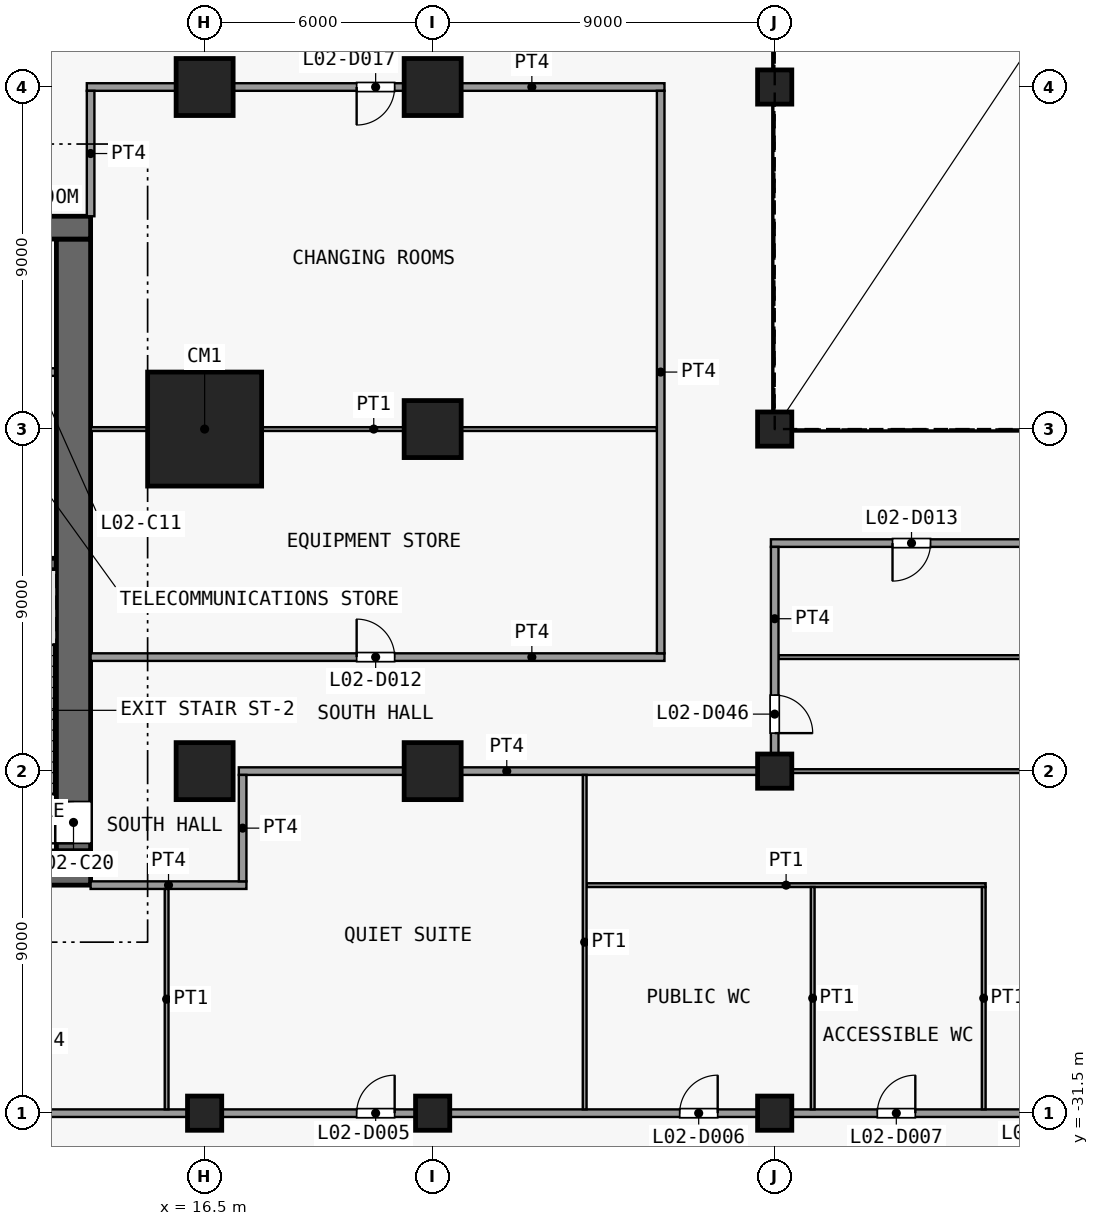
"""IFC4 building model, lengths in metres.
Left out: names, types, materials, properties, quantities, classifications, styles, units other than length and angle.
Written with IfcOpenShell. Run it as: python <this file> out.ifc"""

import sys

from ifc_helpers import new_model, si_unit, direction, frame, frame_2d, origin, origin_2d, place, context, subcontext, project, spatial, rectangle, extrude, element, fill, save


model = new_model("IFC4")
c1 = context("Model", 3, precision=1e-05, world=origin(), true_north=direction((0.0, 1.0)))
c2 = subcontext(c1, "Body", "Model", "MODEL_VIEW")
j1 = project(units=[si_unit("LENGTHUNIT", "METRE"), si_unit("PLANEANGLEUNIT", "RADIAN")], contexts=[c1])
p1 = place(None, origin())
s1 = spatial("IfcSite", under=j1, at=p1, CompositionType="ELEMENT")
p2 = place(p1, origin())
s2 = spatial("IfcBuilding", under=s1, at=p2, CompositionType="ELEMENT")
p3 = place(p2, frame((0.0, 0.0, 13.5)))
s3 = spatial("IfcBuildingStorey", under=s2, at=p3, CompositionType="ELEMENT", Elevation=13.5)
p4 = place(p3, frame((16.5, -31.5, 0.0), z_axis=(0.0, 0.0, 1.0), x_axis=(1.0, 0.0, 0.0)))
e1 = element("IfcColumn", 1, at=p4, inside=s3, PredefinedType="COLUMN", context=c2, shape_type="SweptSolid", body=[
    extrude(rectangle(XDim=0.9, YDim=0.9, at=origin_2d()), origin(), (0.0, 0.0, 1.0), 5.0),
])
p5 = place(p3, frame((16.5, -22.5, 0.0), z_axis=(0.0, 0.0, 1.0), x_axis=(1.0, 0.0, 0.0)))
e2 = element("IfcColumn", 2, at=p5, inside=s3, PredefinedType="COLUMN", context=c2, shape_type="SweptSolid", body=[
    extrude(rectangle(XDim=1.5, YDim=1.5, at=origin_2d()), origin(), (0.0, 0.0, 1.0), 5.0),
])
p6 = place(p3, frame((16.5, -13.5, 0.0), z_axis=(0.0, 0.0, 1.0), x_axis=(1.0, 0.0, 0.0)))
e3 = element("IfcColumn", 3, at=p6, inside=s3, PredefinedType="COLUMN", context=c2, shape_type="SweptSolid", body=[
    extrude(rectangle(XDim=3.0, YDim=3.0, at=origin_2d()), origin(), (0.0, 0.0, 1.0), 5.0),
])
p7 = place(p3, frame((16.5, -4.5, 0.0), z_axis=(0.0, 0.0, 1.0), x_axis=(1.0, 0.0, 0.0)))
e4 = element("IfcColumn", 4, at=p7, inside=s3, PredefinedType="COLUMN", context=c2, shape_type="SweptSolid", body=[
    extrude(rectangle(XDim=1.5, YDim=1.5, at=origin_2d()), origin(), (0.0, 0.0, 1.0), 5.0),
])
p8 = place(p3, frame((22.5, -31.5, 0.0), z_axis=(0.0, 0.0, 1.0), x_axis=(1.0, 0.0, 0.0)))
e5 = element("IfcColumn", 5, at=p8, inside=s3, PredefinedType="COLUMN", context=c2, shape_type="SweptSolid", body=[
    extrude(rectangle(XDim=0.9, YDim=0.9, at=origin_2d()), origin(), (0.0, 0.0, 1.0), 5.0),
])
for number, where, z_axis, x_axis in (
    (6, (22.5, -22.5, 0.0), (0.0, 0.0, 1.0), (1.0, 0.0, 0.0)),
    (7, (22.5, -13.5, 0.0), (0.0, 0.0, 1.0), (1.0, 0.0, 0.0)),
    (8, (22.5, -4.5, 0.0), (0.0, 0.0, 1.0), (1.0, 0.0, 0.0)),
):
    element("IfcColumn", number, at=place(p3, frame(where, z_axis=z_axis, x_axis=x_axis)), inside=s3, PredefinedType="COLUMN", context=c2, shape_type="SweptSolid", body=[
        extrude(rectangle(XDim=1.5, YDim=1.5, at=origin_2d()), origin(), (0.0, 0.0, 1.0), 5.0),
    ])
for number, where, z_axis, x_axis in (
    (9, (31.5, -31.5, 0.0), (0.0, 0.0, 1.0), (1.0, 0.0, 0.0)),
    (10, (31.5, -22.5, 0.0), (0.0, 0.0, 1.0), (1.0, 0.0, 0.0)),
    (11, (31.5, -13.5, 0.0), (0.0, 0.0, 1.0), (1.0, 0.0, 0.0)),
    (12, (31.5, -4.5, 0.0), (0.0, 0.0, 1.0), (1.0, 0.0, 0.0)),
):
    element("IfcColumn", number, at=place(p3, frame(where, z_axis=z_axis, x_axis=x_axis)), inside=s3, PredefinedType="COLUMN", context=c2, shape_type="SweptSolid", body=[
        extrude(rectangle(XDim=0.9, YDim=0.9, at=origin_2d()), origin(), (0.0, 0.0, 1.0), 5.0),
    ])
p9 = place(p3, frame((-13.5, -25.05, 0.0), z_axis=(0.0, 0.0, 1.0), x_axis=(1.0, 0.0, 0.0)))
e13 = element("IfcWall", 13, at=p9, inside=s3, PredefinedType="SHEAR", context=c2, shape_type="SweptSolid", body=[
    extrude(rectangle(XDim=27.0, YDim=0.9, at=frame_2d((13.5, 0.0))), origin(), (0.0, 0.0, 1.0), 4.65),
])
p10 = place(p3, frame((-13.5, -8.2, 0.0), z_axis=(0.0, 0.0, 1.0), x_axis=(1.0, 0.0, 0.0)))
e14 = element("IfcWall", 14, at=p10, inside=s3, PredefinedType="SHEAR", context=c2, shape_type="SweptSolid", body=[
    extrude(rectangle(XDim=27.0, YDim=0.6, at=frame_2d((13.5, 0.0))), origin(), (0.0, 0.0, 1.0), 4.65),
])
p11 = place(p10, frame((7.8, 0.0, 0.0)))
e15 = element("IfcOpeningElement", 15, at=p11, cuts=e14, PredefinedType="OPENING", context=c2, shape_type="SweptSolid", body=[
    extrude(rectangle(XDim=1.8, YDim=2.1, at=frame_2d((0.9, 1.05))), frame((0.0, 0.31, 0.0), z_axis=(0.0, -1.0, 0.0), x_axis=(1.0, 0.0, 0.0)), (0.0, 0.0, 1.0), 0.62),
])
p12 = place(p10, frame((17.4, 0.0, 0.0)))
e16 = element("IfcOpeningElement", 16, at=p12, cuts=e14, PredefinedType="OPENING", context=c2, shape_type="SweptSolid", body=[
    extrude(rectangle(XDim=1.8, YDim=2.1, at=frame_2d((0.9, 1.05))), frame((0.0, 0.31, 0.0), z_axis=(0.0, -1.0, 0.0), x_axis=(1.0, 0.0, 0.0)), (0.0, 0.0, 1.0), 0.62),
])
p13 = place(p10, frame((2.725, 0.0, 0.0)))
e17 = element("IfcOpeningElement", 17, at=p13, cuts=e14, PredefinedType="OPENING", context=c2, shape_type="SweptSolid", body=[
    extrude(rectangle(XDim=0.9, YDim=2.1, at=frame_2d((0.45, 1.05))), frame((0.0, 0.31, 0.0), z_axis=(0.0, -1.0, 0.0), x_axis=(1.0, 0.0, 0.0)), (0.0, 0.0, 1.0), 0.62),
])
p14 = place(p10, frame((23.375, 0.0, 0.0)))
e18 = element("IfcOpeningElement", 18, at=p14, cuts=e14, PredefinedType="OPENING", context=c2, shape_type="SweptSolid", body=[
    extrude(rectangle(XDim=0.9, YDim=2.1, at=frame_2d((0.45, 1.05))), frame((0.0, 0.31, 0.0), z_axis=(0.0, -1.0, 0.0), x_axis=(1.0, 0.0, 0.0)), (0.0, 0.0, 1.0), 0.62),
])
p15 = place(p3, frame((13.05, -24.6, 0.0), z_axis=(0.0, 0.0, 1.0), x_axis=(0.0, 1.0, 0.0)))
e19 = element("IfcWall", 19, at=p15, inside=s3, PredefinedType="SHEAR", context=c2, shape_type="SweptSolid", body=[
    extrude(rectangle(XDim=16.1, YDim=0.9, at=frame_2d((8.05, 0.0))), origin(), (0.0, 0.0, 1.0), 4.65),
])
p16 = place(p15, frame((0.2, 0.0, 0.0)))
e20 = element("IfcOpeningElement", 20, at=p16, cuts=e19, PredefinedType="OPENING", context=c2, shape_type="SweptSolid", body=[
    extrude(rectangle(XDim=1.1, YDim=2.1, at=frame_2d((0.55, 1.05))), frame((0.0, 0.46, 0.0), z_axis=(0.0, -1.0, 0.0), x_axis=(1.0, 0.0, 0.0)), (0.0, 0.0, 1.0), 0.92),
])
p17 = place(p3, frame((9.5, -17.05, 0.0), z_axis=(0.0, 0.0, 1.0), x_axis=(1.0, 0.0, 0.0)))
e21 = element("IfcWall", 21, at=p17, inside=s3, PredefinedType="SHEAR", context=c2, shape_type="SweptSolid", body=[
    extrude(rectangle(XDim=3.1, YDim=0.3, at=frame_2d((1.55, 0.0))), origin(), (0.0, 0.0, 1.0), 4.65),
])
p18 = place(p3, frame((11.15, -12.0, 0.0), z_axis=(0.0, 0.0, 1.0), x_axis=(1.0, 0.0, 0.0)))
e22 = element("IfcWall", 22, at=p18, inside=s3, PredefinedType="PARTITIONING", context=c2, shape_type="SweptSolid", body=[
    extrude(rectangle(XDim=1.45, YDim=0.2, at=frame_2d((0.725, 0.0))), origin(), (0.0, 0.0, 1.0), 4.65),
])
p19 = place(p3, frame((-25.9, -31.5, 0.0), z_axis=(0.0, 0.0, 1.0), x_axis=(1.0, 0.0, 0.0)))
e23 = element("IfcWall", 23, at=p19, inside=s3, PredefinedType="PARTITIONING", context=c2, shape_type="SweptSolid", body=[
    extrude(rectangle(XDim=78.15, YDim=0.2, at=frame_2d((39.075, 0.0))), origin(), (0.0, 0.0, 1.0), 4.65),
])
p20 = place(p19, frame((4.0, 0.0, 0.0)))
e24 = element("IfcOpeningElement", 24, at=p20, cuts=e23, PredefinedType="OPENING", context=c2, shape_type="SweptSolid", body=[
    extrude(rectangle(XDim=1.8, YDim=2.1, at=frame_2d((0.9, 1.05))), frame((0.0, 0.11, 0.0), z_axis=(0.0, -1.0, 0.0), x_axis=(1.0, 0.0, 0.0)), (0.0, 0.0, 1.0), 0.22),
])
p21 = place(p19, frame((16.0, 0.0, 0.0)))
e25 = element("IfcOpeningElement", 25, at=p21, cuts=e23, PredefinedType="OPENING", context=c2, shape_type="SweptSolid", body=[
    extrude(rectangle(XDim=1.8, YDim=2.1, at=frame_2d((0.9, 1.05))), frame((0.0, 0.11, 0.0), z_axis=(0.0, -1.0, 0.0), x_axis=(1.0, 0.0, 0.0)), (0.0, 0.0, 1.0), 0.22),
])
p22 = place(p19, frame((24.1, 0.0, 0.0)))
e26 = element("IfcOpeningElement", 26, at=p22, cuts=e23, PredefinedType="OPENING", context=c2, shape_type="SweptSolid", body=[
    extrude(rectangle(XDim=1.0, YDim=2.1, at=frame_2d((0.5, 1.05))), frame((0.0, 0.11, 0.0), z_axis=(0.0, -1.0, 0.0), x_axis=(1.0, 0.0, 0.0)), (0.0, 0.0, 1.0), 0.22),
])
p23 = place(p19, frame((37.0, 0.0, 0.0)))
e27 = element("IfcOpeningElement", 27, at=p23, cuts=e23, PredefinedType="OPENING", context=c2, shape_type="SweptSolid", body=[
    extrude(rectangle(XDim=1.0, YDim=2.1, at=frame_2d((0.5, 1.05))), frame((0.0, 0.11, 0.0), z_axis=(0.0, -1.0, 0.0), x_axis=(1.0, 0.0, 0.0)), (0.0, 0.0, 1.0), 0.22),
])
p24 = place(p19, frame((46.4, 0.0, 0.0)))
e28 = element("IfcOpeningElement", 28, at=p24, cuts=e23, PredefinedType="OPENING", context=c2, shape_type="SweptSolid", body=[
    extrude(rectangle(XDim=1.0, YDim=2.1, at=frame_2d((0.5, 1.05))), frame((0.0, 0.11, 0.0), z_axis=(0.0, -1.0, 0.0), x_axis=(1.0, 0.0, 0.0)), (0.0, 0.0, 1.0), 0.22),
])
p25 = place(p19, frame((54.9, 0.0, 0.0)))
e29 = element("IfcOpeningElement", 29, at=p25, cuts=e23, PredefinedType="OPENING", context=c2, shape_type="SweptSolid", body=[
    extrude(rectangle(XDim=1.0, YDim=2.1, at=frame_2d((0.5, 1.05))), frame((0.0, 0.11, 0.0), z_axis=(0.0, -1.0, 0.0), x_axis=(1.0, 0.0, 0.0)), (0.0, 0.0, 1.0), 0.22),
])
p26 = place(p19, frame((60.1, 0.0, 0.0)))
e30 = element("IfcOpeningElement", 30, at=p26, cuts=e23, PredefinedType="OPENING", context=c2, shape_type="SweptSolid", body=[
    extrude(rectangle(XDim=1.0, YDim=2.1, at=frame_2d((0.5, 1.05))), frame((0.0, 0.11, 0.0), z_axis=(0.0, -1.0, 0.0), x_axis=(1.0, 0.0, 0.0)), (0.0, 0.0, 1.0), 0.22),
])
p27 = place(p19, frame((64.0, 0.0, 0.0)))
e31 = element("IfcOpeningElement", 31, at=p27, cuts=e23, PredefinedType="OPENING", context=c2, shape_type="SweptSolid", body=[
    extrude(rectangle(XDim=1.8, YDim=2.1, at=frame_2d((0.9, 1.05))), frame((0.0, 0.11, 0.0), z_axis=(0.0, -1.0, 0.0), x_axis=(1.0, 0.0, 0.0)), (0.0, 0.0, 1.0), 0.22),
])
p28 = place(p19, frame((73.0, 0.0, 0.0)))
e32 = element("IfcOpeningElement", 32, at=p28, cuts=e23, PredefinedType="OPENING", context=c2, shape_type="SweptSolid", body=[
    extrude(rectangle(XDim=1.8, YDim=2.1, at=frame_2d((0.9, 1.05))), frame((0.0, 0.11, 0.0), z_axis=(0.0, -1.0, 0.0), x_axis=(1.0, 0.0, 0.0)), (0.0, 0.0, 1.0), 0.22),
])
p29 = place(p3, frame((13.5, -25.5, 0.0), z_axis=(0.0, 0.0, 1.0), x_axis=(1.0, 0.0, 0.0)))
e33 = element("IfcWall", 33, at=p29, inside=s3, PredefinedType="PARTITIONING", context=c2, shape_type="SweptSolid", body=[
    extrude(rectangle(XDim=4.1, YDim=0.2, at=frame_2d((2.05, 0.0))), origin(), (0.0, 0.0, 1.0), 4.65),
])
p30 = place(p3, frame((26.55, -25.5, 0.0), z_axis=(0.0, 0.0, 1.0), x_axis=(1.0, 0.0, 0.0)))
e34 = element("IfcWall", 34, at=p30, inside=s3, PredefinedType="PARTITIONING", context=c2, shape_type="SweptSolid", body=[
    extrude(rectangle(XDim=10.5, YDim=0.1, at=frame_2d((5.25, 0.0))), origin(), (0.0, 0.0, 1.0), 4.65),
])
p31 = place(p3, frame((17.4, -22.5, 0.0), z_axis=(0.0, 0.0, 1.0), x_axis=(1.0, 0.0, 0.0)))
e35 = element("IfcWall", 35, at=p31, inside=s3, PredefinedType="PARTITIONING", context=c2, shape_type="SweptSolid", body=[
    extrude(rectangle(XDim=14.1, YDim=0.2, at=frame_2d((7.05, 0.0))), origin(), (0.0, 0.0, 1.0), 4.65),
])
p32 = place(p3, frame((31.5, -22.5, 0.0), z_axis=(0.0, 0.0, 1.0), x_axis=(1.0, 0.0, 0.0)))
e36 = element("IfcWall", 36, at=p32, inside=s3, PredefinedType="PARTITIONING", context=c2, shape_type="SweptSolid", body=[
    extrude(rectangle(XDim=20.95, YDim=0.1, at=frame_2d((10.475, 0.0))), origin(), (0.0, 0.0, 1.0), 4.65),
])
p33 = place(p3, frame((13.5, -19.5, 0.0), z_axis=(0.0, 0.0, 1.0), x_axis=(1.0, 0.0, 0.0)))
e37 = element("IfcWall", 37, at=p33, inside=s3, PredefinedType="PARTITIONING", context=c2, shape_type="SweptSolid", body=[
    extrude(rectangle(XDim=15.1, YDim=0.2, at=frame_2d((7.55, 0.0))), origin(), (0.0, 0.0, 1.0), 4.65),
])
p34 = place(p33, frame((7.0, 0.0, 0.0)))
e38 = element("IfcOpeningElement", 38, at=p34, cuts=e37, PredefinedType="OPENING", context=c2, shape_type="SweptSolid", body=[
    extrude(rectangle(XDim=1.0, YDim=2.1, at=frame_2d((0.5, 1.05))), frame((0.0, 0.11, 0.0), z_axis=(0.0, -1.0, 0.0), x_axis=(1.0, 0.0, 0.0)), (0.0, 0.0, 1.0), 0.22),
])
p35 = place(p3, frame((31.6, -19.5, 0.0), z_axis=(0.0, 0.0, 1.0), x_axis=(1.0, 0.0, 0.0)))
e39 = element("IfcWall", 39, at=p35, inside=s3, PredefinedType="PARTITIONING", context=c2, shape_type="SweptSolid", body=[
    extrude(rectangle(XDim=20.85, YDim=0.1, at=frame_2d((10.425, 0.0))), origin(), (0.0, 0.0, 1.0), 4.65),
])
p36 = place(p3, frame((31.4, -16.5, 0.0), z_axis=(0.0, 0.0, 1.0), x_axis=(1.0, 0.0, 0.0)))
e40 = element("IfcWall", 40, at=p36, inside=s3, PredefinedType="PARTITIONING", context=c2, shape_type="SweptSolid", body=[
    extrude(rectangle(XDim=21.0, YDim=0.2, at=frame_2d((10.5, 0.0))), origin(), (0.0, 0.0, 1.0), 4.65),
])
p37 = place(p36, frame((3.2, 0.0, 0.0)))
e41 = element("IfcOpeningElement", 41, at=p37, cuts=e40, PredefinedType="OPENING", context=c2, shape_type="SweptSolid", body=[
    extrude(rectangle(XDim=1.0, YDim=2.1, at=frame_2d((0.5, 1.05))), frame((0.0, 0.11, 0.0), z_axis=(0.0, -1.0, 0.0), x_axis=(1.0, 0.0, 0.0)), (0.0, 0.0, 1.0), 0.22),
])
p38 = place(p36, frame((14.0, 0.0, 0.0)))
e42 = element("IfcOpeningElement", 42, at=p38, cuts=e40, PredefinedType="OPENING", context=c2, shape_type="SweptSolid", body=[
    extrude(rectangle(XDim=1.0, YDim=2.1, at=frame_2d((0.5, 1.05))), frame((0.0, 0.11, 0.0), z_axis=(0.0, -1.0, 0.0), x_axis=(1.0, 0.0, 0.0)), (0.0, 0.0, 1.0), 0.22),
])
p39 = place(p3, frame((13.5, -13.5, 0.0), z_axis=(0.0, 0.0, 1.0), x_axis=(1.0, 0.0, 0.0)))
e43 = element("IfcWall", 43, at=p39, inside=s3, PredefinedType="PARTITIONING", context=c2, shape_type="SweptSolid", body=[
    extrude(rectangle(XDim=14.9, YDim=0.1, at=frame_2d((7.45, 0.0))), origin(), (0.0, 0.0, 1.0), 4.65),
])
p40 = place(p3, frame((13.4, -4.5, 0.0), z_axis=(0.0, 0.0, 1.0), x_axis=(1.0, 0.0, 0.0)))
e44 = element("IfcWall", 44, at=p40, inside=s3, PredefinedType="PARTITIONING", context=c2, shape_type="SweptSolid", body=[
    extrude(rectangle(XDim=15.2, YDim=0.2, at=frame_2d((7.6, 0.0))), origin(), (0.0, 0.0, 1.0), 4.65),
])
p41 = place(p40, frame((7.1, 0.0, 0.0)))
e45 = element("IfcOpeningElement", 45, at=p41, cuts=e44, PredefinedType="OPENING", context=c2, shape_type="SweptSolid", body=[
    extrude(rectangle(XDim=1.0, YDim=2.1, at=frame_2d((0.5, 1.05))), frame((0.0, 0.11, 0.0), z_axis=(0.0, -1.0, 0.0), x_axis=(1.0, 0.0, 0.0)), (0.0, 0.0, 1.0), 0.22),
])
p42 = place(p3, frame((13.5, -7.9, 0.0), z_axis=(0.0, 0.0, 1.0), x_axis=(0.0, 1.0, 0.0)))
e46 = element("IfcWall", 46, at=p42, inside=s3, PredefinedType="PARTITIONING", context=c2, shape_type="SweptSolid", body=[
    extrude(rectangle(XDim=3.3, YDim=0.2, at=frame_2d((1.65, 0.0))), origin(), (0.0, 0.0, 1.0), 4.65),
])
p43 = place(p3, frame((15.5, -31.4, 0.0), z_axis=(0.0, 0.0, 1.0), x_axis=(0.0, 1.0, 0.0)))
e47 = element("IfcWall", 47, at=p43, inside=s3, PredefinedType="PARTITIONING", context=c2, shape_type="SweptSolid", body=[
    extrude(rectangle(XDim=5.8, YDim=0.1, at=frame_2d((2.9, 0.0))), origin(), (0.0, 0.0, 1.0), 4.65),
])
p44 = place(p3, frame((17.5, -25.4, 0.0), z_axis=(0.0, 0.0, 1.0), x_axis=(0.0, 1.0, 0.0)))
e48 = element("IfcWall", 48, at=p44, inside=s3, PredefinedType="PARTITIONING", context=c2, shape_type="SweptSolid", body=[
    extrude(rectangle(XDim=2.8, YDim=0.2, at=frame_2d((1.4, 0.0))), origin(), (0.0, 0.0, 1.0), 4.65),
])
p45 = place(p3, frame((26.5, -31.4, 0.0), z_axis=(0.0, 0.0, 1.0), x_axis=(0.0, 1.0, 0.0)))
e49 = element("IfcWall", 49, at=p45, inside=s3, PredefinedType="PARTITIONING", context=c2, shape_type="SweptSolid", body=[
    extrude(rectangle(XDim=8.8, YDim=0.1, at=frame_2d((4.4, 0.0))), origin(), (0.0, 0.0, 1.0), 4.65),
])
p46 = place(p3, frame((28.5, -19.4, 0.0), z_axis=(0.0, 0.0, 1.0), x_axis=(0.0, 1.0, 0.0)))
e50 = element("IfcWall", 50, at=p46, inside=s3, PredefinedType="PARTITIONING", context=c2, shape_type="SweptSolid", body=[
    extrude(rectangle(XDim=14.8, YDim=0.2, at=frame_2d((7.4, 0.0))), origin(), (0.0, 0.0, 1.0), 4.65),
])
p47 = place(p3, frame((31.5, -22.4, 0.0), z_axis=(0.0, 0.0, 1.0), x_axis=(0.0, 1.0, 0.0)))
e51 = element("IfcWall", 51, at=p47, inside=s3, PredefinedType="PARTITIONING", context=c2, shape_type="SweptSolid", body=[
    extrude(rectangle(XDim=5.8, YDim=0.2, at=frame_2d((2.9, 0.0))), origin(), (0.0, 0.0, 1.0), 4.65),
])
p48 = place(p47, frame((0.9, 0.0, 0.0)))
e52 = element("IfcOpeningElement", 52, at=p48, cuts=e51, PredefinedType="OPENING", context=c2, shape_type="SweptSolid", body=[
    extrude(rectangle(XDim=1.0, YDim=2.1, at=frame_2d((0.5, 1.05))), frame((0.0, 0.11, 0.0), z_axis=(0.0, -1.0, 0.0), x_axis=(1.0, 0.0, 0.0)), (0.0, 0.0, 1.0), 0.22),
])
for number, where, z_axis, x_axis in (
    (53, (32.5, -31.4, 0.0), (0.0, 0.0, 1.0), (0.0, 1.0, 0.0)),
    (54, (37.0, -31.4, 0.0), (0.0, 0.0, 1.0), (0.0, 1.0, 0.0)),
):
    element("IfcWall", number, at=place(p3, frame(where, z_axis=z_axis, x_axis=x_axis)), inside=s3, PredefinedType="PARTITIONING", context=c2, shape_type="SweptSolid", body=[
        extrude(rectangle(XDim=5.85, YDim=0.1, at=frame_2d((2.925, 0.0))), origin(), (0.0, 0.0, 1.0), 4.65),
    ])
p49 = place(p16, origin())
e55 = element("IfcDoor", 55, at=p49, inside=s3, OperationType="SINGLE_SWING_LEFT", PredefinedType="DOOR", context=c2, shape_type="SweptSolid", body=[
    extrude(rectangle(XDim=1.1, YDim=2.1, at=frame_2d((0.55, 1.05))), frame((0.0, 0.025, 0.0), z_axis=(0.0, -1.0, 0.0), x_axis=(1.0, 0.0, 0.0)), (0.0, 0.0, 1.0), 0.05),
])
fill(e20, e55)
p50 = place(p24, origin())
e56 = element("IfcDoor", 56, at=p50, inside=s3, OperationType="SINGLE_SWING_LEFT", PredefinedType="DOOR", context=c2, shape_type="SweptSolid", body=[
    extrude(rectangle(XDim=1.0, YDim=2.1, at=frame_2d((0.5, 1.05))), frame((0.0, 0.025, 0.0), z_axis=(0.0, -1.0, 0.0), x_axis=(1.0, 0.0, 0.0)), (0.0, 0.0, 1.0), 0.05),
])
fill(e28, e56)
p51 = place(p25, origin())
e57 = element("IfcDoor", 57, at=p51, inside=s3, OperationType="SINGLE_SWING_LEFT", PredefinedType="DOOR", context=c2, shape_type="SweptSolid", body=[
    extrude(rectangle(XDim=1.0, YDim=2.1, at=frame_2d((0.5, 1.05))), frame((0.0, 0.025, 0.0), z_axis=(0.0, -1.0, 0.0), x_axis=(1.0, 0.0, 0.0)), (0.0, 0.0, 1.0), 0.05),
])
fill(e29, e57)
p52 = place(p26, origin())
e58 = element("IfcDoor", 58, at=p52, inside=s3, OperationType="SINGLE_SWING_LEFT", PredefinedType="DOOR", context=c2, shape_type="SweptSolid", body=[
    extrude(rectangle(XDim=1.0, YDim=2.1, at=frame_2d((0.5, 1.05))), frame((0.0, 0.025, 0.0), z_axis=(0.0, -1.0, 0.0), x_axis=(1.0, 0.0, 0.0)), (0.0, 0.0, 1.0), 0.05),
])
fill(e30, e58)
p53 = place(p34, origin())
e59 = element("IfcDoor", 59, at=p53, inside=s3, OperationType="SINGLE_SWING_RIGHT", PredefinedType="DOOR", context=c2, shape_type="SweptSolid", body=[
    extrude(rectangle(XDim=1.0, YDim=2.1, at=frame_2d((0.5, 1.05))), frame((0.0, 0.025, 0.0), z_axis=(0.0, -1.0, 0.0), x_axis=(1.0, 0.0, 0.0)), (0.0, 0.0, 1.0), 0.05),
])
fill(e38, e59)
p54 = place(p37, origin())
e60 = element("IfcDoor", 60, at=p54, inside=s3, OperationType="SINGLE_SWING_LEFT", PredefinedType="DOOR", context=c2, shape_type="SweptSolid", body=[
    extrude(rectangle(XDim=1.0, YDim=2.1, at=frame_2d((0.5, 1.05))), frame((0.0, 0.025, 0.0), z_axis=(0.0, -1.0, 0.0), x_axis=(1.0, 0.0, 0.0)), (0.0, 0.0, 1.0), 0.05),
])
fill(e41, e60)
p55 = place(p41, origin())
e61 = element("IfcDoor", 61, at=p55, inside=s3, OperationType="SINGLE_SWING_LEFT", PredefinedType="DOOR", context=c2, shape_type="SweptSolid", body=[
    extrude(rectangle(XDim=1.0, YDim=2.1, at=frame_2d((0.5, 1.05))), frame((0.0, 0.025, 0.0), z_axis=(0.0, -1.0, 0.0), x_axis=(1.0, 0.0, 0.0)), (0.0, 0.0, 1.0), 0.05),
])
fill(e45, e61)
p56 = place(p48, origin())
e62 = element("IfcDoor", 62, at=p56, inside=s3, OperationType="SINGLE_SWING_LEFT", PredefinedType="DOOR", context=c2, shape_type="SweptSolid", body=[
    extrude(rectangle(XDim=1.0, YDim=2.1, at=frame_2d((0.5, 1.05))), frame((0.0, 0.025, 0.0), z_axis=(0.0, -1.0, 0.0), x_axis=(1.0, 0.0, 0.0)), (0.0, 0.0, 1.0), 0.05),
])
fill(e52, e62)
save(model, sys.argv[1])
